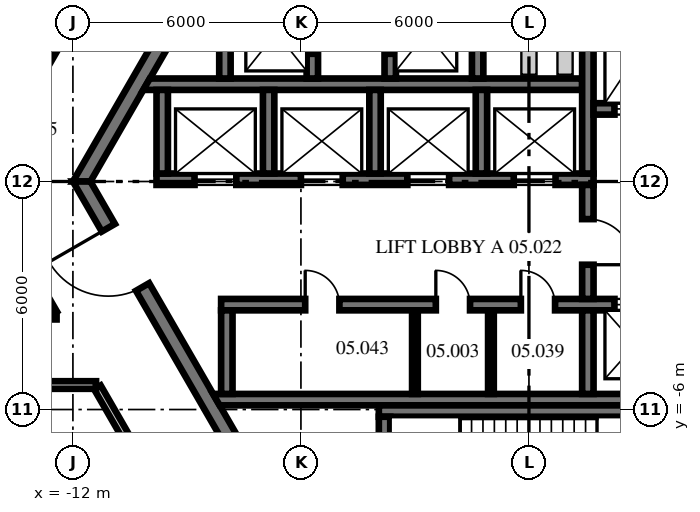
"""IFC4 building model, lengths in metres.
Left out: names, types, materials, properties, quantities, classifications, styles, units other than length and angle.
Written with IfcOpenShell. Run it as: python <this file> out.ifc"""

import sys

from ifc_helpers import new_model, si_unit, direction, frame, frame_2d, origin, place, context, subcontext, project, spatial, polyline, rectangle, outline, extrude, source, transform, mapped, element, fill, save


model = new_model("IFC4")
c1 = context("Model", 3, precision=1e-05, world=origin(), true_north=direction((0.0, 1.0)))
c2 = subcontext(c1, "Body", "Model", "MODEL_VIEW")
j1 = project(units=[si_unit("LENGTHUNIT", "METRE"), si_unit("PLANEANGLEUNIT", "RADIAN")], contexts=[c1])
p1 = place(None, origin())
s1 = spatial("IfcSite", under=j1, at=p1, CompositionType="ELEMENT")
p2 = place(p1, origin())
s2 = spatial("IfcBuilding", under=s1, at=p2, CompositionType="ELEMENT")
p3 = place(p2, frame((0.0, 0.0, 24.6)))
s3 = spatial("IfcBuildingStorey", under=s2, at=p3, CompositionType="ELEMENT", Elevation=24.6)
m1 = source(origin(), c2, "Body", "SweptSolid", [
    extrude(outline(polyline([(-0.115, -0.2), (11.885, -0.2), (11.654, 0.2), (0.115, 0.2), (-0.115, -0.2)])), origin(), (0.0, 0.0, 1.0), 4.1),
])
p4 = place(p3, frame((-5.885, 10.192, 0.0), z_axis=(0.0, 0.0, 1.0), x_axis=(-0.499996592174, -0.866027371285, 0.0)))
e1 = element("IfcWall", 1, at=p4, inside=s3, PredefinedType="SHEAR", context=c2, shape_type="MappedRepresentation", body=[
    mapped(m1, transform((0.0, 0.0, 0.0), scale=1.0)),
])
p5 = place(p4, frame((3.185, 0.0, 0.0)))
e2 = element("IfcOpeningElement", 2, at=p5, cuts=e1, PredefinedType="OPENING", context=c2, shape_type="SweptSolid", body=[
    extrude(rectangle(XDim=1.2, YDim=2.1, at=frame_2d((0.6, 1.05))), frame((0.0, 0.21, 0.0), z_axis=(0.0, -1.0, 0.0), x_axis=(1.0, 0.0, 0.0)), (0.0, 0.0, 1.0), 0.42),
])
p6 = place(p3, frame((-11.769, 0.0, 0.0), z_axis=(0.0, 0.0, 1.0), x_axis=(0.499996592174, -0.866027371285, 0.0)))
e3 = element("IfcWall", 3, at=p6, inside=s3, PredefinedType="SHEAR", context=c2, shape_type="MappedRepresentation", body=[
    mapped(m1, transform((0.0, 0.0, 0.0), scale=1.0)),
])
p7 = place(p6, frame((1.405, 0.0, 0.0)))
e4 = element("IfcOpeningElement", 4, at=p7, cuts=e3, PredefinedType="OPENING", context=c2, shape_type="SweptSolid", body=[
    extrude(rectangle(XDim=1.8, YDim=2.1, at=frame_2d((0.9, 1.05))), frame((0.0, 0.21, 0.0), z_axis=(0.0, -1.0, 0.0), x_axis=(1.0, 0.0, 0.0)), (0.0, 0.0, 1.0), 0.42),
])
p8 = place(p6, frame((7.915, 0.0, 0.0)))
e5 = element("IfcOpeningElement", 5, at=p8, cuts=e3, PredefinedType="OPENING", context=c2, shape_type="SweptSolid", body=[
    extrude(rectangle(XDim=1.2, YDim=2.1, at=frame_2d((0.6, 1.05))), frame((0.0, 0.21, 0.0), z_axis=(0.0, -1.0, 0.0), x_axis=(1.0, 0.0, 0.0)), (0.0, 0.0, 1.0), 0.42),
])
m2 = source(origin(), c2, "Body", "SweptSolid", [
    extrude(rectangle(XDim=11.5, YDim=0.3, at=frame_2d((5.75, 0.0))), origin(), (0.0, 0.0, 1.0), 4.1),
])
p9 = place(p3, frame((-9.8, 0.06, 0.0), z_axis=(0.0, 0.0, 1.0), x_axis=(1.0, 0.0, 0.0)))
e6 = element("IfcWall", 6, at=p9, inside=s3, PredefinedType="SHEAR", context=c2, shape_type="MappedRepresentation", body=[
    mapped(m2, transform((0.0, 0.0, 0.0), scale=1.0)),
])
p10 = place(p9, frame((1.0, 0.0, 0.0)))
e7 = element("IfcOpeningElement", 7, at=p10, cuts=e6, PredefinedType="OPENING", context=c2, shape_type="SweptSolid", body=[
    extrude(rectangle(XDim=1.1, YDim=2.1, at=frame_2d((0.55, 1.05))), frame((0.0, 0.16, 0.0), z_axis=(0.0, -1.0, 0.0), x_axis=(1.0, 0.0, 0.0)), (0.0, 0.0, 1.0), 0.32),
])
p11 = place(p9, frame((3.8, 0.0, 0.0)))
e8 = element("IfcOpeningElement", 8, at=p11, cuts=e6, PredefinedType="OPENING", context=c2, shape_type="SweptSolid", body=[
    extrude(rectangle(XDim=1.1, YDim=2.1, at=frame_2d((0.55, 1.05))), frame((0.0, 0.16, 0.0), z_axis=(0.0, -1.0, 0.0), x_axis=(1.0, 0.0, 0.0)), (0.0, 0.0, 1.0), 0.32),
])
p12 = place(p9, frame((6.6, 0.0, 0.0)))
e9 = element("IfcOpeningElement", 9, at=p12, cuts=e6, PredefinedType="OPENING", context=c2, shape_type="SweptSolid", body=[
    extrude(rectangle(XDim=1.1, YDim=2.1, at=frame_2d((0.55, 1.05))), frame((0.0, 0.16, 0.0), z_axis=(0.0, -1.0, 0.0), x_axis=(1.0, 0.0, 0.0)), (0.0, 0.0, 1.0), 0.32),
])
p13 = place(p9, frame((9.4, 0.0, 0.0)))
e10 = element("IfcOpeningElement", 10, at=p13, cuts=e6, PredefinedType="OPENING", context=c2, shape_type="SweptSolid", body=[
    extrude(rectangle(XDim=1.1, YDim=2.1, at=frame_2d((0.55, 1.05))), frame((0.0, 0.16, 0.0), z_axis=(0.0, -1.0, 0.0), x_axis=(1.0, 0.0, 0.0)), (0.0, 0.0, 1.0), 0.32),
])
m3 = source(origin(), c2, "Body", "SweptSolid", [
    extrude(outline(polyline([(11.2, -0.15), (-0.349, -0.15), (-0.176, 0.15), (11.2, 0.15), (11.2, -0.15)])), origin(), (0.0, 0.0, 1.0), 4.1),
])
p14 = place(p3, frame((-9.8, 2.56, 0.0), z_axis=(0.0, 0.0, 1.0), x_axis=(1.0, 0.0, 0.0)))
e11 = element("IfcWall", 11, at=p14, inside=s3, PredefinedType="SHEAR", context=c2, shape_type="MappedRepresentation", body=[
    mapped(m3, transform((0.0, 0.0, 0.0), scale=1.0)),
])
m4 = source(origin(), c2, "Body", "SweptSolid", [
    extrude(rectangle(XDim=4.45, YDim=0.3, at=frame_2d((2.225, 0.0))), origin(), (0.0, 0.0, 1.0), 4.1),
])
p15 = place(p3, frame((1.55, 0.21, 0.0), z_axis=(0.0, 0.0, 1.0), x_axis=(0.0, 1.0, 0.0)))
e12 = element("IfcWall", 12, at=p15, inside=s3, PredefinedType="SHEAR", context=c2, shape_type="MappedRepresentation", body=[
    mapped(m4, transform((0.0, 0.0, 0.0), scale=1.0)),
])
m5 = source(origin(), c2, "Body", "SweptSolid", [
    extrude(rectangle(XDim=3.0, YDim=0.3, at=frame_2d((1.5, 0.0))), origin(), (0.0, 0.0, 1.0), 4.1),
])
p16 = place(p3, frame((1.7, 1.91, 0.0), z_axis=(0.0, 0.0, 1.0), x_axis=(1.0, 0.0, 0.0)))
e13 = element("IfcWall", 13, at=p16, inside=s3, PredefinedType="SHEAR", context=c2, shape_type="MappedRepresentation", body=[
    mapped(m5, transform((0.0, 0.0, 0.0), scale=1.0)),
])
p17 = place(p16, frame((0.55, 0.0, 0.0)))
e14 = element("IfcOpeningElement", 14, at=p17, cuts=e13, PredefinedType="OPENING", context=c2, shape_type="SweptSolid", body=[
    extrude(rectangle(XDim=1.1, YDim=2.1, at=frame_2d((0.55, 1.05))), frame((0.0, 0.16, 0.0), z_axis=(0.0, -1.0, 0.0), x_axis=(1.0, 0.0, 0.0)), (0.0, 0.0, 1.0), 0.32),
])
m6 = source(origin(), c2, "Body", "SweptSolid", [
    extrude(rectangle(XDim=12.8, YDim=0.3, at=frame_2d((6.4, 0.0))), origin(), (0.0, 0.0, 1.0), 4.1),
])
p18 = place(p3, frame((-8.1, -3.24, 0.0), z_axis=(0.0, 0.0, 1.0), x_axis=(1.0, 0.0, 0.0)))
e15 = element("IfcWall", 15, at=p18, inside=s3, PredefinedType="SHEAR", context=c2, shape_type="MappedRepresentation", body=[
    mapped(m6, transform((0.0, 0.0, 0.0), scale=1.0)),
])
p19 = place(p18, frame((2.212, 0.0, 0.0)))
e16 = element("IfcOpeningElement", 16, at=p19, cuts=e15, PredefinedType="OPENING", context=c2, shape_type="SweptSolid", body=[
    extrude(rectangle(XDim=0.9, YDim=2.1, at=frame_2d((0.45, 1.05))), frame((0.0, 0.16, 0.0), z_axis=(0.0, -1.0, 0.0), x_axis=(1.0, 0.0, 0.0)), (0.0, 0.0, 1.0), 0.32),
])
p20 = place(p18, frame((5.65, 0.0, 0.0)))
e17 = element("IfcOpeningElement", 17, at=p20, cuts=e15, PredefinedType="OPENING", context=c2, shape_type="SweptSolid", body=[
    extrude(rectangle(XDim=0.9, YDim=2.1, at=frame_2d((0.45, 1.05))), frame((0.0, 0.16, 0.0), z_axis=(0.0, -1.0, 0.0), x_axis=(1.0, 0.0, 0.0)), (0.0, 0.0, 1.0), 0.32),
])
p21 = place(p18, frame((7.887, 0.0, 0.0)))
e18 = element("IfcOpeningElement", 18, at=p21, cuts=e15, PredefinedType="OPENING", context=c2, shape_type="SweptSolid", body=[
    extrude(rectangle(XDim=0.9, YDim=2.1, at=frame_2d((0.45, 1.05))), frame((0.0, 0.16, 0.0), z_axis=(0.0, -1.0, 0.0), x_axis=(1.0, 0.0, 0.0)), (0.0, 0.0, 1.0), 0.32),
])
p22 = place(p18, frame((10.35, 0.0, 0.0)))
e19 = element("IfcOpeningElement", 19, at=p22, cuts=e15, PredefinedType="OPENING", context=c2, shape_type="SweptSolid", body=[
    extrude(rectangle(XDim=1.1, YDim=2.1, at=frame_2d((0.55, 1.05))), frame((0.0, 0.16, 0.0), z_axis=(0.0, -1.0, 0.0), x_axis=(1.0, 0.0, 0.0)), (0.0, 0.0, 1.0), 0.32),
])
m7 = source(origin(), c2, "Body", "SweptSolid", [
    extrude(outline(polyline([(12.0, -0.15), (-0.04, -0.15), (-0.213, 0.15), (12.0, 0.15), (12.0, -0.15)])), origin(), (0.0, 0.0, 1.0), 4.1),
])
p23 = place(p3, frame((-8.1, -5.74, 0.0), z_axis=(0.0, 0.0, 1.0), x_axis=(1.0, 0.0, 0.0)))
e20 = element("IfcWall", 20, at=p23, inside=s3, PredefinedType="SHEAR", context=c2, shape_type="MappedRepresentation", body=[
    mapped(m7, transform((0.0, 0.0, 0.0), scale=1.0)),
])
m8 = source(origin(), c2, "Body", "SweptSolid", [
    extrude(rectangle(XDim=2.2, YDim=0.3, at=frame_2d((1.1, 0.0))), origin(), (0.0, 0.0, 1.0), 4.1),
])
p24 = place(p3, frame((-7.95, -5.59, 0.0), z_axis=(0.0, 0.0, 1.0), x_axis=(0.0, 1.0, 0.0)))
e21 = element("IfcWall", 21, at=p24, inside=s3, PredefinedType="SHEAR", context=c2, shape_type="MappedRepresentation", body=[
    mapped(m8, transform((0.0, 0.0, 0.0), scale=1.0)),
])
m9 = source(origin(), c2, "Body", "SweptSolid", [
    extrude(rectangle(XDim=2.2, YDim=0.3, at=frame_2d((1.1, 0.0))), origin(), (0.0, 0.0, 1.0), 4.1),
])
p25 = place(p3, frame((-9.65, 0.21, 0.0), z_axis=(0.0, 0.0, 1.0), x_axis=(0.0, 1.0, 0.0)))
e22 = element("IfcWall", 22, at=p25, inside=s3, PredefinedType="SHEAR", context=c2, shape_type="MappedRepresentation", body=[
    mapped(m9, transform((0.0, 0.0, 0.0), scale=1.0)),
])
p26 = place(p3, frame((1.55, -5.59, 0.0), z_axis=(0.0, 0.0, 1.0), x_axis=(0.0, 1.0, 0.0)))
e23 = element("IfcWall", 23, at=p26, inside=s3, PredefinedType="SHEAR", context=c2, shape_type="MappedRepresentation", body=[
    mapped(m8, transform((0.0, 0.0, 0.0), scale=1.0)),
])
p27 = place(p3, frame((1.55, -3.09, 0.0), z_axis=(0.0, 0.0, 1.0), x_axis=(0.0, 1.0, 0.0)))
e24 = element("IfcWall", 24, at=p27, inside=s3, PredefinedType="SHEAR", context=c2, shape_type="MappedRepresentation", body=[
    mapped(m5, transform((0.0, 0.0, 0.0), scale=1.0)),
])
p28 = place(p27, frame((0.9, 0.0, 0.0)))
e25 = element("IfcOpeningElement", 25, at=p28, cuts=e24, PredefinedType="OPENING", context=c2, shape_type="SweptSolid", body=[
    extrude(rectangle(XDim=1.2, YDim=2.1, at=frame_2d((0.6, 1.05))), frame((0.0, 0.16, 0.0), z_axis=(0.0, -1.0, 0.0), x_axis=(1.0, 0.0, 0.0)), (0.0, 0.0, 1.0), 0.32),
])
m10 = source(origin(), c2, "Body", "SweptSolid", [
    extrude(outline(polyline([(0.0, -0.15), (8.95, -0.15), (8.65, 0.15), (0.0, 0.15), (0.0, -0.15)])), origin(), (0.0, 0.0, 1.0), 4.1),
])
p29 = place(p3, frame((-3.95, -6.04, 0.0), z_axis=(0.0, 0.0, 1.0), x_axis=(1.0, 0.0, 0.0)))
e26 = element("IfcWall", 26, at=p29, inside=s3, PredefinedType="SHEAR", context=c2, shape_type="MappedRepresentation", body=[
    mapped(m10, transform((0.0, 0.0, 0.0), scale=1.0)),
])
m11 = source(origin(), c2, "Body", "SweptSolid", [
    extrude(outline(polyline([(3.8, -0.15), (-0.004, -0.15), (-0.004, 0.15), (3.8, 0.15), (3.8, -0.15)])), origin(), (0.0, 0.0, 1.0), 4.1),
])
p30 = place(p3, frame((-3.8, -9.99, 0.0), z_axis=(0.0, 0.0, 1.0), x_axis=(0.0, 1.0, 0.0)))
e27 = element("IfcWall", 27, at=p30, inside=s3, PredefinedType="SHEAR", context=c2, shape_type="MappedRepresentation", body=[
    mapped(m11, transform((0.0, 0.0, 0.0), scale=1.0)),
])
m12 = source(origin(), c2, "Body", "SweptSolid", [
    extrude(rectangle(XDim=2.4, YDim=0.3, at=frame_2d((1.2, 0.0))), origin(), (0.0, 0.0, 1.0), 4.1),
])
p31 = place(p3, frame((-8.0, 2.71, 0.0), z_axis=(0.0, 0.0, 1.0), x_axis=(0.0, 1.0, 0.0)))
e28 = element("IfcWall", 28, at=p31, inside=s3, PredefinedType="SHEAR", context=c2, shape_type="MappedRepresentation", body=[
    mapped(m12, transform((0.0, 0.0, 0.0), scale=1.0)),
])
p32 = place(p3, frame((-5.7, 2.71, 0.0), z_axis=(0.0, 0.0, 1.0), x_axis=(0.0, 1.0, 0.0)))
e29 = element("IfcWall", 29, at=p32, inside=s3, PredefinedType="SHEAR", context=c2, shape_type="MappedRepresentation", body=[
    mapped(m12, transform((0.0, 0.0, 0.0), scale=1.0)),
])
p33 = place(p32, frame((0.65, 0.0, 0.0)))
e30 = element("IfcOpeningElement", 30, at=p33, cuts=e29, PredefinedType="OPENING", context=c2, shape_type="SweptSolid", body=[
    extrude(rectangle(XDim=1.1, YDim=2.1, at=frame_2d((0.55, 1.05))), frame((0.0, 0.16, 0.0), z_axis=(0.0, -1.0, 0.0), x_axis=(1.0, 0.0, 0.0)), (0.0, 0.0, 1.0), 0.32),
])
p34 = place(p3, frame((-3.65, 2.71, 0.0), z_axis=(0.0, 0.0, 1.0), x_axis=(0.0, 1.0, 0.0)))
e31 = element("IfcWall", 31, at=p34, inside=s3, PredefinedType="SHEAR", context=c2, shape_type="MappedRepresentation", body=[
    mapped(m12, transform((0.0, 0.0, 0.0), scale=1.0)),
])
p35 = place(p34, frame((0.65, 0.0, 0.0)))
e32 = element("IfcOpeningElement", 32, at=p35, cuts=e31, PredefinedType="OPENING", context=c2, shape_type="SweptSolid", body=[
    extrude(rectangle(XDim=1.1, YDim=2.1, at=frame_2d((0.55, 1.05))), frame((0.0, 0.16, 0.0), z_axis=(0.0, -1.0, 0.0), x_axis=(1.0, 0.0, 0.0)), (0.0, 0.0, 1.0), 0.32),
])
p36 = place(p3, frame((-1.35, 2.71, 0.0), z_axis=(0.0, 0.0, 1.0), x_axis=(0.0, 1.0, 0.0)))
e33 = element("IfcWall", 33, at=p36, inside=s3, PredefinedType="SHEAR", context=c2, shape_type="MappedRepresentation", body=[
    mapped(m12, transform((0.0, 0.0, 0.0), scale=1.0)),
])
for number, where, z_axis, x_axis in (
    (34, (-6.85, 0.21, 0.0), (0.0, 0.0, 1.0), (0.0, 1.0, 0.0)),
    (35, (-4.05, 0.21, 0.0), (0.0, 0.0, 1.0), (0.0, 1.0, 0.0)),
    (36, (-1.25, 0.21, 0.0), (0.0, 0.0, 1.0), (0.0, 1.0, 0.0)),
):
    element("IfcWall", number, at=place(p3, frame(where, z_axis=z_axis, x_axis=x_axis)), inside=s3, PredefinedType="SHEAR", context=c2, shape_type="MappedRepresentation", body=[
        mapped(m9, transform((0.0, 0.0, 0.0), scale=1.0)),
    ])
m13 = source(origin(), c2, "Body", "SweptSolid", [
    extrude(rectangle(XDim=2.2, YDim=0.15, at=frame_2d((1.1, 0.0))), origin(), (0.0, 0.0, 1.0), 4.1),
])
for number, where, z_axis, x_axis in (
    (37, (-3.0, -5.59, 0.0), (0.0, 0.0, 1.0), (0.0, 1.0, 0.0)),
    (38, (-1.0, -5.59, 0.0), (0.0, 0.0, 1.0), (0.0, 1.0, 0.0)),
):
    element("IfcWall", number, at=place(p3, frame(where, z_axis=z_axis, x_axis=x_axis)), inside=s3, PredefinedType="PARTITIONING", context=c2, shape_type="MappedRepresentation", body=[
        mapped(m13, transform((0.0, 0.0, 0.0), scale=1.0)),
    ])
m14 = source(origin(), c2, "Body", "SweptSolid", [
    extrude(rectangle(XDim=3.945, YDim=0.15, at=frame_2d((1.973, 0.0))), origin(), (0.0, 0.0, 1.0), 4.1),
])
p37 = place(p3, frame((-14.458, -0.043, 0.0), z_axis=(0.0, 0.0, 1.0), x_axis=(0.499979592829, -0.866037185549, 0.0)))
e39 = element("IfcWall", 39, at=p37, inside=s3, PredefinedType="PARTITIONING", context=c2, shape_type="MappedRepresentation", body=[
    mapped(m14, transform((0.0, 0.0, 0.0), scale=1.0)),
])
m15 = source(origin(), c2, "Body", "SweptSolid", [
    extrude(rectangle(XDim=8.229, YDim=0.2, at=frame_2d((4.115, 0.0))), origin(), (0.0, 0.0, 1.0), 4.1),
])
p38 = place(p3, frame((-11.356, -5.416, 0.0), z_axis=(0.0, 0.0, 1.0), x_axis=(0.500012644715, -0.866018103232, 0.0)))
e40 = element("IfcWall", 40, at=p38, inside=s3, PredefinedType="PARTITIONING", context=c2, shape_type="MappedRepresentation", body=[
    mapped(m15, transform((0.0, 0.0, 0.0), scale=1.0)),
])
m16 = source(origin(), c2, "Body", "SweptSolid", [
    extrude(rectangle(XDim=20.193, YDim=0.2, at=frame_2d((10.097, 0.0))), origin(), (0.0, 0.0, 1.0), 4.1),
])
p39 = place(p3, frame((-31.584, -5.355, 0.0), z_axis=(0.0, 0.0, 1.0), x_axis=(1.0, 0.0, 0.0)))
e41 = element("IfcWall", 41, at=p39, inside=s3, PredefinedType="PARTITIONING", context=c2, shape_type="MappedRepresentation", body=[
    mapped(m16, transform((0.0, 0.0, 0.0), scale=1.0)),
])
p40 = place(p39, frame((9.548, 0.0, 0.0)))
e42 = element("IfcOpeningElement", 42, at=p40, cuts=e41, PredefinedType="OPENING", context=c2, shape_type="SweptSolid", body=[
    extrude(rectangle(XDim=1.0, YDim=2.1, at=frame_2d((0.5, 1.05))), frame((0.0, 0.11, 0.0), z_axis=(0.0, -1.0, 0.0), x_axis=(1.0, 0.0, 0.0)), (0.0, 0.0, 1.0), 0.22),
])
m17 = source(origin(), c2, "Body", "SweptSolid", [
    extrude(rectangle(XDim=11.547, YDim=0.15, at=frame_2d((5.773, 0.0))), origin(), (0.0, 0.0, 1.0), 4.1),
])
p41 = place(p3, frame((-23.977, -3.555, 0.0), z_axis=(0.0, 0.0, 1.0), x_axis=(1.0, 0.0, 0.0)))
e43 = element("IfcWall", 43, at=p41, inside=s3, PredefinedType="PARTITIONING", context=c2, shape_type="MappedRepresentation", body=[
    mapped(m17, transform((0.0, 0.0, 0.0), scale=1.0)),
])
p42 = place(p41, frame((5.997, 0.0, 0.0)))
e44 = element("IfcOpeningElement", 44, at=p42, cuts=e43, PredefinedType="OPENING", context=c2, shape_type="SweptSolid", body=[
    extrude(rectangle(XDim=0.9, YDim=2.1, at=frame_2d((0.45, 1.05))), frame((0.0, 0.085, 0.0), z_axis=(0.0, -1.0, 0.0), x_axis=(1.0, 0.0, 0.0)), (0.0, 0.0, 1.0), 0.17),
])
m18 = source(origin(), c2, "Body", "SweptSolid", [
    extrude(rectangle(XDim=4.111, YDim=0.15, at=frame_2d((2.056, 0.0))), origin(), (0.0, 0.0, 1.0), 4.1),
])
p43 = place(p3, frame((-14.473, 0.017, 0.0), z_axis=(0.0, 0.0, 1.0), x_axis=(0.500022314862, 0.866012519909, 0.0)))
e45 = element("IfcWall", 45, at=p43, inside=s3, PredefinedType="PARTITIONING", context=c2, shape_type="MappedRepresentation", body=[
    mapped(m18, transform((0.0, 0.0, 0.0), scale=1.0)),
])
p44 = place(p43, frame((1.625, 0.0, 0.0)))
e46 = element("IfcOpeningElement", 46, at=p44, cuts=e45, PredefinedType="OPENING", context=c2, shape_type="SweptSolid", body=[
    extrude(rectangle(XDim=0.9, YDim=2.1, at=frame_2d((0.45, 1.05))), frame((0.0, 0.085, 0.0), z_axis=(0.0, -1.0, 0.0), x_axis=(1.0, 0.0, 0.0)), (0.0, 0.0, 1.0), 0.17),
])
p45 = place(p7, frame((1.8, 0.0, 0.0), z_axis=(0.0, 0.0, 1.0), x_axis=(-1.0, 0.0, 0.0)))
e47 = element("IfcDoor", 47, at=p45, inside=s3, OperationType="DOUBLE_DOOR_DOUBLE_SWING", PredefinedType="DOOR", context=c2, shape_type="SweptSolid", body=[
    extrude(rectangle(XDim=1.8, YDim=2.1, at=frame_2d((0.9, 1.05))), frame((0.0, 0.025, 0.0), z_axis=(0.0, -1.0, 0.0), x_axis=(1.0, 0.0, 0.0)), (0.0, 0.0, 1.0), 0.05),
])
fill(e4, e47)
p46 = place(p28, frame((1.2, 0.0, 0.0), z_axis=(0.0, 0.0, 1.0), x_axis=(-1.0, 0.0, 0.0)))
e48 = element("IfcDoor", 48, at=p46, inside=s3, OperationType="SINGLE_SWING_RIGHT", PredefinedType="DOOR", context=c2, shape_type="SweptSolid", body=[
    extrude(rectangle(XDim=1.2, YDim=2.1, at=frame_2d((0.6, 1.05))), frame((0.0, 0.025, 0.0), z_axis=(0.0, -1.0, 0.0), x_axis=(1.0, 0.0, 0.0)), (0.0, 0.0, 1.0), 0.05),
])
fill(e25, e48)
p47 = place(p19, origin())
e49 = element("IfcDoor", 49, at=p47, inside=s3, OperationType="SINGLE_SWING_LEFT", PredefinedType="DOOR", context=c2, shape_type="SweptSolid", body=[
    extrude(rectangle(XDim=0.9, YDim=2.1, at=frame_2d((0.45, 1.05))), frame((0.0, 0.025, 0.0), z_axis=(0.0, -1.0, 0.0), x_axis=(1.0, 0.0, 0.0)), (0.0, 0.0, 1.0), 0.05),
])
fill(e16, e49)
p48 = place(p20, origin())
e50 = element("IfcDoor", 50, at=p48, inside=s3, OperationType="SINGLE_SWING_LEFT", PredefinedType="DOOR", context=c2, shape_type="SweptSolid", body=[
    extrude(rectangle(XDim=0.9, YDim=2.1, at=frame_2d((0.45, 1.05))), frame((0.0, 0.025, 0.0), z_axis=(0.0, -1.0, 0.0), x_axis=(1.0, 0.0, 0.0)), (0.0, 0.0, 1.0), 0.05),
])
fill(e17, e50)
p49 = place(p21, origin())
e51 = element("IfcDoor", 51, at=p49, inside=s3, OperationType="SINGLE_SWING_LEFT", PredefinedType="DOOR", context=c2, shape_type="SweptSolid", body=[
    extrude(rectangle(XDim=0.9, YDim=2.1, at=frame_2d((0.45, 1.05))), frame((0.0, 0.025, 0.0), z_axis=(0.0, -1.0, 0.0), x_axis=(1.0, 0.0, 0.0)), (0.0, 0.0, 1.0), 0.05),
])
fill(e18, e51)
p50 = place(p10, origin())
e52 = element("IfcDoor", 52, at=p50, inside=s3, OperationType="DOUBLE_DOOR_SLIDING", PredefinedType="DOOR", context=c2, shape_type="SweptSolid", body=[
    extrude(rectangle(XDim=1.1, YDim=2.1, at=frame_2d((0.55, 1.05))), frame((0.0, 0.025, 0.0), z_axis=(0.0, -1.0, 0.0), x_axis=(1.0, 0.0, 0.0)), (0.0, 0.0, 1.0), 0.05),
])
fill(e7, e52)
p51 = place(p11, origin())
e53 = element("IfcDoor", 53, at=p51, inside=s3, OperationType="DOUBLE_DOOR_SLIDING", PredefinedType="DOOR", context=c2, shape_type="SweptSolid", body=[
    extrude(rectangle(XDim=1.1, YDim=2.1, at=frame_2d((0.55, 1.05))), frame((0.0, 0.025, 0.0), z_axis=(0.0, -1.0, 0.0), x_axis=(1.0, 0.0, 0.0)), (0.0, 0.0, 1.0), 0.05),
])
fill(e8, e53)
p52 = place(p12, origin())
e54 = element("IfcDoor", 54, at=p52, inside=s3, OperationType="DOUBLE_DOOR_SLIDING", PredefinedType="DOOR", context=c2, shape_type="SweptSolid", body=[
    extrude(rectangle(XDim=1.1, YDim=2.1, at=frame_2d((0.55, 1.05))), frame((0.0, 0.025, 0.0), z_axis=(0.0, -1.0, 0.0), x_axis=(1.0, 0.0, 0.0)), (0.0, 0.0, 1.0), 0.05),
])
fill(e9, e54)
p53 = place(p13, origin())
e55 = element("IfcDoor", 55, at=p53, inside=s3, OperationType="DOUBLE_DOOR_SLIDING", PredefinedType="DOOR", context=c2, shape_type="SweptSolid", body=[
    extrude(rectangle(XDim=1.1, YDim=2.1, at=frame_2d((0.55, 1.05))), frame((0.0, 0.025, 0.0), z_axis=(0.0, -1.0, 0.0), x_axis=(1.0, 0.0, 0.0)), (0.0, 0.0, 1.0), 0.05),
])
fill(e10, e55)
p54 = place(p17, origin())
e56 = element("IfcDoor", 56, at=p54, inside=s3, OperationType="DOUBLE_DOOR_SLIDING", PredefinedType="DOOR", context=c2, shape_type="SweptSolid", body=[
    extrude(rectangle(XDim=1.1, YDim=2.1, at=frame_2d((0.55, 1.05))), frame((0.0, 0.025, 0.0), z_axis=(0.0, -1.0, 0.0), x_axis=(1.0, 0.0, 0.0)), (0.0, 0.0, 1.0), 0.05),
])
fill(e14, e56)
p55 = place(p22, origin())
e57 = element("IfcDoor", 57, at=p55, inside=s3, OperationType="DOUBLE_DOOR_SLIDING", PredefinedType="DOOR", context=c2, shape_type="SweptSolid", body=[
    extrude(rectangle(XDim=1.1, YDim=2.1, at=frame_2d((0.55, 1.05))), frame((0.0, 0.025, 0.0), z_axis=(0.0, -1.0, 0.0), x_axis=(1.0, 0.0, 0.0)), (0.0, 0.0, 1.0), 0.05),
])
fill(e19, e57)
p56 = place(p33, origin())
e58 = element("IfcDoor", 58, at=p56, inside=s3, OperationType="DOUBLE_DOOR_SLIDING", PredefinedType="DOOR", context=c2, shape_type="SweptSolid", body=[
    extrude(rectangle(XDim=1.1, YDim=2.1, at=frame_2d((0.55, 1.05))), frame((0.0, 0.025, 0.0), z_axis=(0.0, -1.0, 0.0), x_axis=(1.0, 0.0, 0.0)), (0.0, 0.0, 1.0), 0.05),
])
fill(e30, e58)
p57 = place(p35, origin())
e59 = element("IfcDoor", 59, at=p57, inside=s3, OperationType="DOUBLE_DOOR_SLIDING", PredefinedType="DOOR", context=c2, shape_type="SweptSolid", body=[
    extrude(rectangle(XDim=1.1, YDim=2.1, at=frame_2d((0.55, 1.05))), frame((0.0, 0.025, 0.0), z_axis=(0.0, -1.0, 0.0), x_axis=(1.0, 0.0, 0.0)), (0.0, 0.0, 1.0), 0.05),
])
fill(e32, e59)
save(model, sys.argv[1])
